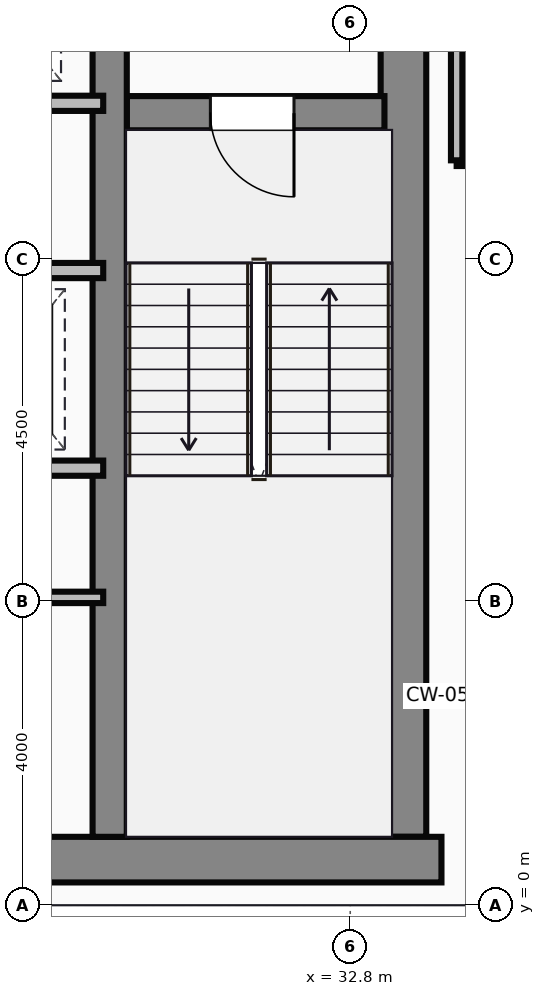
"""IFC4 building model, lengths in metres.
Left out: names, types, materials, properties, quantities, classifications, styles, units other than length and angle.
Written with IfcOpenShell. Run it as: python <this file> out.ifc"""

import sys

from ifc_helpers import new_model, si_unit, direction, frame, frame_2d, origin, place, context, subcontext, project, spatial, rectangle, extrude, source, transform, mapped, element, fill, save


model = new_model("IFC4")
c1 = context("Model", 3, precision=1e-05, world=origin(), true_north=direction((0.0, 1.0)))
c2 = subcontext(c1, "Body", "Model", "MODEL_VIEW")
j1 = project(units=[si_unit("LENGTHUNIT", "METRE"), si_unit("PLANEANGLEUNIT", "RADIAN")], contexts=[c1])
p1 = place(None, origin())
s1 = spatial("IfcSite", under=j1, at=p1, CompositionType="ELEMENT")
p2 = place(p1, origin())
s2 = spatial("IfcBuilding", under=s1, at=p2, CompositionType="ELEMENT")
p3 = place(p2, frame((0.0, 0.0, 258.8)))
s3 = spatial("IfcBuildingStorey", under=s2, at=p3, CompositionType="ELEMENT", Elevation=258.8)
m1 = source(origin(), c2, "Body", "SweptSolid", [
    extrude(rectangle(XDim=29.5, YDim=0.6, at=frame_2d((14.75, 0.0))), origin(), (0.0, 0.0, 1.0), 3.65),
])
p4 = place(p3, frame((4.5, 0.6, 0.0), z_axis=(0.0, 0.0, 1.0), x_axis=(1.0, 0.0, 0.0)))
e1 = element("IfcWall", 1, at=p4, inside=s3, PredefinedType="SHEAR", context=c2, shape_type="MappedRepresentation", body=[
    mapped(m1, transform((0.0, 0.0, 0.0))),
])
m2 = source(origin(), c2, "Body", "SweptSolid", [
    extrude(rectangle(XDim=13.1, YDim=0.6, at=frame_2d((6.55, 0.0))), origin(), (0.0, 0.0, 1.0), 3.65),
])
p5 = place(p3, frame((33.5, 0.9, 0.0), z_axis=(0.0, 0.0, 1.0), x_axis=(0.0, 1.0, 0.0)))
e2 = element("IfcWall", 2, at=p5, inside=s3, PredefinedType="SHEAR", context=c2, shape_type="MappedRepresentation", body=[
    mapped(m2, transform((0.0, 0.0, 0.0))),
])
m3 = source(origin(), c2, "Body", "SweptSolid", [
    extrude(rectangle(XDim=12.5, YDim=0.45, at=frame_2d((6.25, 0.0))), origin(), (0.0, 0.0, 1.0), 3.65),
])
p6 = place(p3, frame((29.635, 0.9, 0.0), z_axis=(0.0, 0.0, 1.0), x_axis=(0.0, 1.0, 0.0)))
e3 = element("IfcWall", 3, at=p6, inside=s3, PredefinedType="SHEAR", context=c2, shape_type="MappedRepresentation", body=[
    mapped(m3, transform((0.0, 0.0, 0.0))),
])
m4 = source(origin(), c2, "Body", "SweptSolid", [
    extrude(rectangle(XDim=3.39, YDim=0.45, at=frame_2d((1.695, 0.0))), origin(), (0.0, 0.0, 1.0), 3.65),
])
p7 = place(p3, frame((29.86, 10.42, 0.0), z_axis=(0.0, 0.0, 1.0), x_axis=(1.0, 0.0, 0.0)))
e4 = element("IfcWall", 4, at=p7, inside=s3, PredefinedType="SHEAR", context=c2, shape_type="MappedRepresentation", body=[
    mapped(m4, transform((0.0, 0.0, 0.0))),
])
p8 = place(p7, frame((1.1, 0.0, 0.0)))
e5 = element("IfcOpeningElement", 5, at=p8, cuts=e4, PredefinedType="OPENING", context=c2, shape_type="SweptSolid", body=[
    extrude(rectangle(XDim=1.1, YDim=2.15, at=frame_2d((0.55, 1.075))), frame((0.0, 0.235, 0.0), z_axis=(0.0, -1.0, 0.0), x_axis=(1.0, 0.0, 0.0)), (0.0, 0.0, 1.0), 0.47),
])
m5 = source(origin(), c2, "Body", "SweptSolid", [
    extrude(rectangle(XDim=8.8, YDim=0.2, at=frame_2d((4.4, 0.0))), origin(), (0.0, 0.0, 1.0), 3.4),
])
p9 = place(p3, frame((20.75, 10.55, 0.0), z_axis=(0.0, 0.0, 1.0), x_axis=(1.0, 0.0, 0.0)))
e6 = element("IfcWall", 6, at=p9, inside=s3, PredefinedType="PARTITIONING", context=c2, shape_type="MappedRepresentation", body=[
    mapped(m5, transform((0.0, 0.0, 0.0))),
])
p10 = place(p9, frame((0.5, 0.0, 0.0)))
e7 = element("IfcOpeningElement", 7, at=p10, cuts=e6, PredefinedType="OPENING", context=c2, shape_type="SweptSolid", body=[
    extrude(rectangle(XDim=1.05, YDim=2.15, at=frame_2d((0.525, 1.075))), frame((0.0, 0.11, 0.0), z_axis=(0.0, -1.0, 0.0), x_axis=(1.0, 0.0, 0.0)), (0.0, 0.0, 1.0), 0.22),
])
p11 = place(p9, frame((2.6, 0.0, 0.0)))
e8 = element("IfcOpeningElement", 8, at=p11, cuts=e6, PredefinedType="OPENING", context=c2, shape_type="SweptSolid", body=[
    extrude(rectangle(XDim=1.05, YDim=2.15, at=frame_2d((0.525, 1.075))), frame((0.0, 0.11, 0.0), z_axis=(0.0, -1.0, 0.0), x_axis=(1.0, 0.0, 0.0)), (0.0, 0.0, 1.0), 0.22),
])
p12 = place(p9, frame((4.7, 0.0, 0.0)))
e9 = element("IfcOpeningElement", 9, at=p12, cuts=e6, PredefinedType="OPENING", context=c2, shape_type="SweptSolid", body=[
    extrude(rectangle(XDim=1.05, YDim=2.15, at=frame_2d((0.525, 1.075))), frame((0.0, 0.11, 0.0), z_axis=(0.0, -1.0, 0.0), x_axis=(1.0, 0.0, 0.0)), (0.0, 0.0, 1.0), 0.22),
])
p13 = place(p9, frame((6.8, 0.0, 0.0)))
e10 = element("IfcOpeningElement", 10, at=p13, cuts=e6, PredefinedType="OPENING", context=c2, shape_type="SweptSolid", body=[
    extrude(rectangle(XDim=1.05, YDim=2.15, at=frame_2d((0.525, 1.075))), frame((0.0, 0.11, 0.0), z_axis=(0.0, -1.0, 0.0), x_axis=(1.0, 0.0, 0.0)), (0.0, 0.0, 1.0), 0.22),
])
m6 = source(origin(), c2, "Body", "SweptSolid", [
    extrude(rectangle(XDim=4.55, YDim=0.2, at=frame_2d((2.275, 0.0))), origin(), (0.0, 0.0, 1.0), 3.4),
])
p14 = place(p3, frame((25.0, 8.35, 0.0), z_axis=(0.0, 0.0, 1.0), x_axis=(1.0, 0.0, 0.0)))
e11 = element("IfcWall", 11, at=p14, inside=s3, PredefinedType="PARTITIONING", context=c2, shape_type="MappedRepresentation", body=[
    mapped(m6, transform((0.0, 0.0, 0.0))),
])
p15 = place(p14, frame((0.5, 0.0, 0.0)))
e12 = element("IfcOpeningElement", 12, at=p15, cuts=e11, PredefinedType="OPENING", context=c2, shape_type="SweptSolid", body=[
    extrude(rectangle(XDim=1.05, YDim=2.15, at=frame_2d((0.525, 1.075))), frame((0.0, 0.11, 0.0), z_axis=(0.0, -1.0, 0.0), x_axis=(1.0, 0.0, 0.0)), (0.0, 0.0, 1.0), 0.22),
])
p16 = place(p14, frame((2.6, 0.0, 0.0)))
e13 = element("IfcOpeningElement", 13, at=p16, cuts=e11, PredefinedType="OPENING", context=c2, shape_type="SweptSolid", body=[
    extrude(rectangle(XDim=1.05, YDim=2.15, at=frame_2d((0.525, 1.075))), frame((0.0, 0.11, 0.0), z_axis=(0.0, -1.0, 0.0), x_axis=(1.0, 0.0, 0.0)), (0.0, 0.0, 1.0), 0.22),
])
p17 = place(p3, frame((25.0, 5.75, 0.0), z_axis=(0.0, 0.0, 1.0), x_axis=(1.0, 0.0, 0.0)))
e14 = element("IfcWall", 14, at=p17, inside=s3, PredefinedType="PARTITIONING", context=c2, shape_type="MappedRepresentation", body=[
    mapped(m6, transform((0.0, 0.0, 0.0))),
])
m7 = source(origin(), c2, "Body", "SweptSolid", [
    extrude(rectangle(XDim=4.55, YDim=0.15, at=frame_2d((2.275, 0.0))), origin(), (0.0, 0.0, 1.0), 3.4),
])
p18 = place(p3, frame((25.0, 4.05, 0.0), z_axis=(0.0, 0.0, 1.0), x_axis=(1.0, 0.0, 0.0)))
e15 = element("IfcWall", 15, at=p18, inside=s3, PredefinedType="PARTITIONING", context=c2, shape_type="MappedRepresentation", body=[
    mapped(m7, transform((0.0, 0.0, 0.0))),
])
m8 = source(origin(), c2, "Body", "SweptSolid", [
    extrude(rectangle(XDim=4.8, YDim=0.15, at=frame_2d((2.4, 0.0))), origin(), (0.0, 0.0, 1.0), 3.4),
])
p19 = place(p3, frame((34.2, 9.8, 0.0), z_axis=(0.0, 0.0, 1.0), x_axis=(1.0, 0.0, 0.0)))
e16 = element("IfcWall", 16, at=p19, inside=s3, PredefinedType="PARTITIONING", context=c2, shape_type="MappedRepresentation", body=[
    mapped(m8, transform((0.0, 0.0, 0.0))),
])
m9 = source(origin(), c2, "Body", "SweptSolid", [
    extrude(rectangle(XDim=4.18, YDim=0.15, at=frame_2d((2.09, 0.0))), origin(), (0.0, 0.0, 1.0), 3.4),
])
p20 = place(p3, frame((34.2, 9.8, 0.0), z_axis=(0.0, 0.0, 1.0), x_axis=(0.0, 1.0, 0.0)))
e17 = element("IfcWall", 17, at=p20, inside=s3, PredefinedType="PARTITIONING", context=c2, shape_type="MappedRepresentation", body=[
    mapped(m9, transform((0.0, 0.0, 0.0))),
])
m10 = source(origin(), c2, "Body", "SweptSolid", [
    extrude(rectangle(XDim=1.1, YDim=2.15, at=frame_2d((0.55, 1.075))), frame((0.0, 0.025, 0.0), z_axis=(0.0, -1.0, 0.0), x_axis=(1.0, 0.0, 0.0)), (0.0, 0.0, 1.0), 0.05),
])
p21 = place(p8, frame((1.1, 0.0, 0.0), z_axis=(0.0, 0.0, 1.0), x_axis=(-1.0, 0.0, 0.0)))
e18 = element("IfcDoor", 18, at=p21, inside=s3, OperationType="SINGLE_SWING_RIGHT", PredefinedType="DOOR", context=c2, shape_type="MappedRepresentation", body=[
    mapped(m10, transform((0.0, 0.0, 0.0))),
])
fill(e5, e18)
save(model, sys.argv[1])
